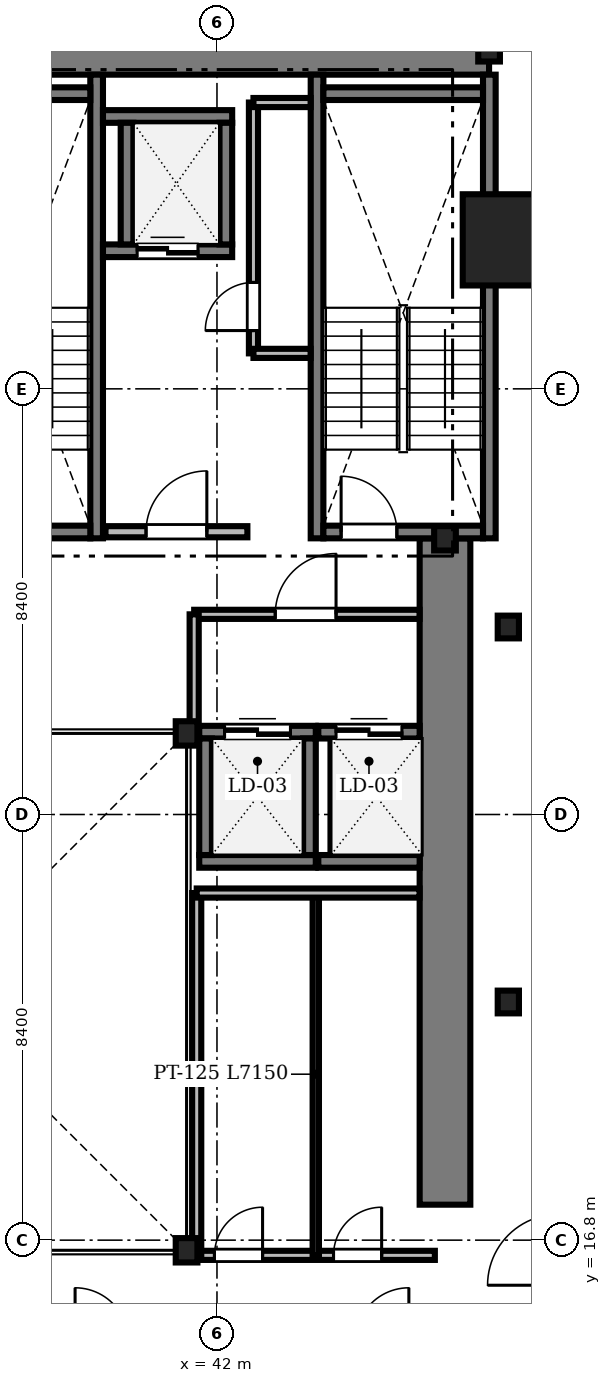
"""IFC4 building model, lengths in metres.
Left out: names, types, materials, properties, quantities, classifications, styles, units other than length and angle.
Written with IfcOpenShell. Run it as: python <this file> out.ifc"""

import sys

from ifc_helpers import new_model, si_unit, direction, frame, frame_2d, origin, origin_2d, place, context, subcontext, project, spatial, rectangle, i_section, extrude, source, transform, mapped, element, fill, save


model = new_model("IFC4")
c1 = context("Model", 3, precision=1e-05, world=origin(), true_north=direction((0.0, 1.0)))
c2 = subcontext(c1, "Body", "Model", "MODEL_VIEW")
j1 = project(units=[si_unit("LENGTHUNIT", "METRE"), si_unit("PLANEANGLEUNIT", "RADIAN")], contexts=[c1])
p1 = place(None, origin())
s1 = spatial("IfcSite", under=j1, at=p1, CompositionType="ELEMENT")
p2 = place(p1, origin())
s2 = spatial("IfcBuilding", under=s1, at=p2, CompositionType="ELEMENT")
p3 = place(p2, frame((0.0, 0.0, 86.0)))
s3 = spatial("IfcBuildingStorey", under=s2, at=p3, CompositionType="ELEMENT", Elevation=86.0)
m1 = source(origin(), c2, "Body", "SweptSolid", [
    extrude(rectangle(XDim=17.52, YDim=1.0, at=frame_2d((8.76, 0.0))), origin(), (0.0, 0.0, 1.0), 3.41),
])
p4 = place(p3, frame((29.85, 40.3, 0.0), z_axis=(0.0, 0.0, 1.0), x_axis=(1.0, 0.0, 0.0)))
e1 = element("IfcWall", 1, at=p4, inside=s3, PredefinedType="SHEAR", context=c2, shape_type="MappedRepresentation", body=[
    mapped(m1, transform((0.0, 0.0, 0.0), scale=1.0)),
])
m2 = source(origin(), c2, "Body", "SweptSolid", [
    extrude(rectangle(XDim=13.15, YDim=1.0, at=frame_2d((6.575, 0.0))), origin(), (0.0, 0.0, 1.0), 3.41),
])
p5 = place(p3, frame((46.5, 17.5, 0.0), z_axis=(0.0, 0.0, 1.0), x_axis=(0.0, 1.0, 0.0)))
e2 = element("IfcWall", 2, at=p5, inside=s3, PredefinedType="SHEAR", context=c2, shape_type="MappedRepresentation", body=[
    mapped(m2, transform((0.0, 0.0, 0.0), scale=1.0)),
])
m3 = source(origin(), c2, "Body", "SweptSolid", [
    extrude(i_section(OverallWidth=0.428, OverallDepth=0.481, WebThickness=0.04, FlangeThickness=0.063, FilletRadius=0.015, at=origin_2d()), origin(), (0.0, 0.0, 1.0), 3.41),
])
for number, where, z_axis, x_axis in (
    (3, (41.4, 16.6, 0.0), (0.0, 0.0, 1.0), (1.0, 0.0, 0.0)),
    (4, (41.4, 26.8, 0.0), (0.0, 0.0, 1.0), (1.0, 0.0, 0.0)),
    (5, (46.5, 30.65, 0.0), (0.0, 0.0, 1.0), (1.0, 0.0, 0.0)),
    (6, (47.37, 40.3, 0.0), (0.0, 0.0, 1.0), (1.0, 0.0, 0.0)),
):
    element("IfcColumn", number, at=place(p3, frame(where, z_axis=z_axis, x_axis=x_axis)), inside=s3, PredefinedType="COLUMN", context=c2, shape_type="MappedRepresentation", body=[
        mapped(m3, transform((0.0, 0.0, 0.0), scale=1.0)),
    ])
m4 = source(origin(), c2, "Body", "SweptSolid", [
    extrude(rectangle(XDim=1.8, YDim=1.8, at=origin_2d()), origin(), (0.0, 0.0, 1.0), 3.41),
])
p6 = place(p3, frame((47.75, 36.54, 0.0), z_axis=(0.0, 0.0, 1.0), x_axis=(1.0, 0.0, 0.0)))
e7 = element("IfcColumn", 7, at=p6, inside=s3, PredefinedType="COLUMN", context=c2, shape_type="MappedRepresentation", body=[
    mapped(m4, transform((0.0, 0.0, 0.0), scale=1.0)),
])
m5 = source(origin(), c2, "Body", "SweptSolid", [
    extrude(i_section(OverallWidth=0.419, OverallDepth=0.449, WebThickness=0.031, FlangeThickness=0.048, FilletRadius=0.015, at=origin_2d()), origin(), (0.0, 0.0, 1.0), 3.41),
])
for number, where, z_axis, x_axis in (
    (8, (47.75, 21.5, 0.0), (0.0, 0.0, 1.0), (1.0, 0.0, 0.0)),
    (9, (47.75, 28.9, 0.0), (0.0, 0.0, 1.0), (1.0, 0.0, 0.0)),
):
    element("IfcColumn", number, at=place(p3, frame(where, z_axis=z_axis, x_axis=x_axis)), inside=s3, PredefinedType="COLUMN", context=c2, shape_type="MappedRepresentation", body=[
        mapped(m5, transform((0.0, 0.0, 0.0), scale=1.0)),
    ])
m6 = source(origin(), c2, "Body", "SweptSolid", [
    extrude(rectangle(XDim=9.15, YDim=0.25, at=frame_2d((4.575, 0.0))), origin(), (0.0, 0.0, 1.0), 3.45),
])
p7 = place(p3, frame((39.625, 30.65, 0.0), z_axis=(0.0, 0.0, 1.0), x_axis=(0.0, 1.0, 0.0)))
e10 = element("IfcWall", 10, at=p7, inside=s3, PredefinedType="SOLIDWALL", context=c2, shape_type="MappedRepresentation", body=[
    mapped(m6, transform((0.0, 0.0, 0.0), scale=1.0)),
])
m7 = source(origin(), c2, "Body", "SweptSolid", [
    extrude(rectangle(XDim=3.15, YDim=0.25, at=frame_2d((1.575, 0.0))), origin(), (0.0, 0.0, 1.0), 3.45),
])
p8 = place(p3, frame((36.35, 39.425, 0.0), z_axis=(0.0, 0.0, 1.0), x_axis=(1.0, 0.0, 0.0)))
e11 = element("IfcWall", 11, at=p8, inside=s3, PredefinedType="SOLIDWALL", context=c2, shape_type="MappedRepresentation", body=[
    mapped(m7, transform((0.0, 0.0, 0.0), scale=1.0)),
])
p9 = place(p3, frame((36.35, 30.775, 0.0), z_axis=(0.0, 0.0, 1.0), x_axis=(1.0, 0.0, 0.0)))
e12 = element("IfcWall", 12, at=p9, inside=s3, PredefinedType="SOLIDWALL", context=c2, shape_type="MappedRepresentation", body=[
    mapped(m7, transform((0.0, 0.0, 0.0), scale=1.0)),
])
m8 = source(origin(), c2, "Body", "SweptSolid", [
    extrude(rectangle(XDim=1.1, YDim=2.2, at=frame_2d((0.55, 1.1))), frame((0.0, 0.135, 0.0), z_axis=(0.0, -1.0, 0.0), x_axis=(1.0, 0.0, 0.0)), (0.0, 0.0, 1.0), 0.27),
])
p10 = place(p9, frame((0.35, 0.0, 0.0)))
e13 = element("IfcOpeningElement", 13, at=p10, cuts=e12, PredefinedType="OPENING", context=c2, shape_type="MappedRepresentation", body=[
    mapped(m8, transform((0.0, 0.0, 0.0), scale=1.0)),
])
for number, where, z_axis, x_axis in (
    (14, (43.975, 30.65, 0.0), (0.0, 0.0, 1.0), (0.0, 1.0, 0.0)),
    (15, (47.375, 30.65, 0.0), (0.0, 0.0, 1.0), (0.0, 1.0, 0.0)),
):
    element("IfcWall", number, at=place(p3, frame(where, z_axis=z_axis, x_axis=x_axis)), inside=s3, PredefinedType="SOLIDWALL", context=c2, shape_type="MappedRepresentation", body=[
        mapped(m6, transform((0.0, 0.0, 0.0), scale=1.0)),
    ])
p11 = place(p3, frame((44.1, 39.425, 0.0), z_axis=(0.0, 0.0, 1.0), x_axis=(1.0, 0.0, 0.0)))
e16 = element("IfcWall", 16, at=p11, inside=s3, PredefinedType="SOLIDWALL", context=c2, shape_type="MappedRepresentation", body=[
    mapped(m7, transform((0.0, 0.0, 0.0), scale=1.0)),
])
p12 = place(p3, frame((44.1, 30.775, 0.0), z_axis=(0.0, 0.0, 1.0), x_axis=(1.0, 0.0, 0.0)))
e17 = element("IfcWall", 17, at=p12, inside=s3, PredefinedType="SOLIDWALL", context=c2, shape_type="MappedRepresentation", body=[
    mapped(m7, transform((0.0, 0.0, 0.0), scale=1.0)),
])
p13 = place(p12, frame((0.35, 0.0, 0.0)))
e18 = element("IfcOpeningElement", 18, at=p13, cuts=e17, PredefinedType="OPENING", context=c2, shape_type="MappedRepresentation", body=[
    mapped(m8, transform((0.0, 0.0, 0.0), scale=1.0)),
])
m9 = source(origin(), c2, "Body", "SweptSolid", [
    extrude(rectangle(XDim=2.8, YDim=0.22, at=frame_2d((1.4, 0.0))), origin(), (0.0, 0.0, 1.0), 3.41),
])
p14 = place(p3, frame((39.8, 30.78, 0.0), z_axis=(0.0, 0.0, 1.0), x_axis=(1.0, 0.0, 0.0)))
e19 = element("IfcWall", 19, at=p14, inside=s3, PredefinedType="SOLIDWALL", context=c2, shape_type="MappedRepresentation", body=[
    mapped(m9, transform((0.0, 0.0, 0.0), scale=1.0)),
])
m10 = source(origin(), c2, "Body", "SweptSolid", [
    extrude(rectangle(XDim=1.2, YDim=2.2, at=frame_2d((0.6, 1.1))), frame((0.0, 0.12, 0.0), z_axis=(0.0, -1.0, 0.0), x_axis=(1.0, 0.0, 0.0)), (0.0, 0.0, 1.0), 0.24),
])
p15 = place(p14, frame((0.8, 0.0, 0.0)))
e20 = element("IfcOpeningElement", 20, at=p15, cuts=e19, PredefinedType="OPENING", context=c2, shape_type="MappedRepresentation", body=[
    mapped(m10, transform((0.0, 0.0, 0.0), scale=1.0)),
])
m11 = source(origin(), c2, "Body", "SweptSolid", [
    extrude(rectangle(XDim=2.55, YDim=0.25, at=frame_2d((1.275, 0.0))), origin(), (0.0, 0.0, 1.0), 3.41),
])
p16 = place(p3, frame((39.75, 36.325, 0.0), z_axis=(0.0, 0.0, 1.0), x_axis=(1.0, 0.0, 0.0)))
e21 = element("IfcWall", 21, at=p16, inside=s3, PredefinedType="SOLIDWALL", context=c2, shape_type="MappedRepresentation", body=[
    mapped(m11, transform((0.0, 0.0, 0.0), scale=1.0)),
])
m12 = source(origin(), c2, "Body", "SweptSolid", [
    extrude(rectangle(XDim=1.2, YDim=2.25, at=frame_2d((0.6, 1.125))), frame((0.0, 0.135, 0.0), z_axis=(0.0, -1.0, 0.0), x_axis=(1.0, 0.0, 0.0)), (0.0, 0.0, 1.0), 0.27),
])
p17 = place(p16, frame((0.675, 0.0, 0.0)))
e22 = element("IfcOpeningElement", 22, at=p17, cuts=e21, PredefinedType="OPENING", context=c2, shape_type="MappedRepresentation", body=[
    mapped(m12, transform((0.0, 0.0, 0.0), scale=1.0)),
])
p18 = place(p3, frame((39.75, 38.975, 0.0), z_axis=(0.0, 0.0, 1.0), x_axis=(1.0, 0.0, 0.0)))
e23 = element("IfcWall", 23, at=p18, inside=s3, PredefinedType="SOLIDWALL", context=c2, shape_type="MappedRepresentation", body=[
    mapped(m11, transform((0.0, 0.0, 0.0), scale=1.0)),
])
m13 = source(origin(), c2, "Body", "SweptSolid", [
    extrude(rectangle(XDim=2.4, YDim=0.25, at=frame_2d((1.2, 0.0))), origin(), (0.0, 0.0, 1.0), 3.41),
])
for number, where, z_axis, x_axis in (
    (24, (40.225, 36.45, 0.0), (0.0, 0.0, 1.0), (0.0, 1.0, 0.0)),
    (25, (42.175, 36.45, 0.0), (0.0, 0.0, 1.0), (0.0, 1.0, 0.0)),
):
    element("IfcWall", number, at=place(p3, frame(where, z_axis=z_axis, x_axis=x_axis)), inside=s3, PredefinedType="SOLIDWALL", context=c2, shape_type="MappedRepresentation", body=[
        mapped(m13, transform((0.0, 0.0, 0.0), scale=1.0)),
    ])
m14 = source(origin(), c2, "Body", "SweptSolid", [
    extrude(rectangle(XDim=2.3, YDim=0.25, at=frame_2d((1.15, 0.0))), origin(), (0.0, 0.0, 1.0), 3.41),
])
p19 = place(p3, frame((41.65, 24.275, 0.0), z_axis=(0.0, 0.0, 1.0), x_axis=(1.0, 0.0, 0.0)))
e26 = element("IfcWall", 26, at=p19, inside=s3, PredefinedType="SOLIDWALL", context=c2, shape_type="MappedRepresentation", body=[
    mapped(m14, transform((0.0, 0.0, 0.0), scale=1.0)),
])
p20 = place(p3, frame((41.65, 26.825, 0.0), z_axis=(0.0, 0.0, 1.0), x_axis=(1.0, 0.0, 0.0)))
e27 = element("IfcWall", 27, at=p20, inside=s3, PredefinedType="SOLIDWALL", context=c2, shape_type="MappedRepresentation", body=[
    mapped(m14, transform((0.0, 0.0, 0.0), scale=1.0)),
])
m15 = source(origin(), c2, "Body", "SweptSolid", [
    extrude(rectangle(XDim=1.3, YDim=2.3, at=frame_2d((0.65, 1.15))), frame((0.0, 0.135, 0.0), z_axis=(0.0, -1.0, 0.0), x_axis=(1.0, 0.0, 0.0)), (0.0, 0.0, 1.0), 0.27),
])
p21 = place(p20, frame((0.5, 0.0, 0.0)))
e28 = element("IfcOpeningElement", 28, at=p21, cuts=e27, PredefinedType="OPENING", context=c2, shape_type="MappedRepresentation", body=[
    mapped(m15, transform((0.0, 0.0, 0.0), scale=1.0)),
])
for number, where, z_axis, x_axis in (
    (29, (41.775, 24.4, 0.0), (0.0, 0.0, 1.0), (0.0, 1.0, 0.0)),
    (30, (43.825, 24.4, 0.0), (0.0, 0.0, 1.0), (0.0, 1.0, 0.0)),
):
    element("IfcWall", number, at=place(p3, frame(where, z_axis=z_axis, x_axis=x_axis)), inside=s3, PredefinedType="SOLIDWALL", context=c2, shape_type="MappedRepresentation", body=[
        mapped(m14, transform((0.0, 0.0, 0.0), scale=1.0)),
    ])
m16 = source(origin(), c2, "Body", "SweptSolid", [
    extrude(rectangle(XDim=2.0, YDim=0.25, at=frame_2d((1.0, 0.0))), origin(), (0.0, 0.0, 1.0), 3.41),
])
p22 = place(p3, frame((44.0, 24.275, 0.0), z_axis=(0.0, 0.0, 1.0), x_axis=(1.0, 0.0, 0.0)))
e31 = element("IfcWall", 31, at=p22, inside=s3, PredefinedType="SOLIDWALL", context=c2, shape_type="MappedRepresentation", body=[
    mapped(m16, transform((0.0, 0.0, 0.0), scale=1.0)),
])
p23 = place(p3, frame((44.0, 26.825, 0.0), z_axis=(0.0, 0.0, 1.0), x_axis=(1.0, 0.0, 0.0)))
e32 = element("IfcWall", 32, at=p23, inside=s3, PredefinedType="SOLIDWALL", context=c2, shape_type="MappedRepresentation", body=[
    mapped(m16, transform((0.0, 0.0, 0.0), scale=1.0)),
])
p24 = place(p23, frame((0.35, 0.0, 0.0)))
e33 = element("IfcOpeningElement", 33, at=p24, cuts=e32, PredefinedType="OPENING", context=c2, shape_type="MappedRepresentation", body=[
    mapped(m15, transform((0.0, 0.0, 0.0), scale=1.0)),
])
m17 = source(origin(), c2, "Body", "SweptSolid", [
    extrude(rectangle(XDim=4.95, YDim=0.18, at=frame_2d((2.475, 0.0))), origin(), (0.0, 0.0, 1.0), 3.41),
])
p25 = place(p3, frame((42.72, 34.3, 0.0), z_axis=(0.0, 0.0, 1.0), x_axis=(0.0, 1.0, 0.0)))
e34 = element("IfcWall", 34, at=p25, inside=s3, PredefinedType="PARTITIONING", context=c2, shape_type="MappedRepresentation", body=[
    mapped(m17, transform((0.0, 0.0, 0.0), scale=1.0)),
])
m18 = source(origin(), c2, "Body", "SweptSolid", [
    extrude(rectangle(XDim=0.95, YDim=2.15, at=frame_2d((0.475, 1.075))), frame((0.0, 0.1, 0.0), z_axis=(0.0, -1.0, 0.0), x_axis=(1.0, 0.0, 0.0)), (0.0, 0.0, 1.0), 0.2),
])
p26 = place(p25, frame((0.45, 0.0, 0.0)))
e35 = element("IfcOpeningElement", 35, at=p26, cuts=e34, PredefinedType="OPENING", context=c2, shape_type="MappedRepresentation", body=[
    mapped(m18, transform((0.0, 0.0, 0.0), scale=1.0)),
])
m19 = source(origin(), c2, "Body", "SweptSolid", [
    extrude(rectangle(XDim=4.448, YDim=0.18, at=frame_2d((2.224, 0.0))), origin(), (0.0, 0.0, 1.0), 3.042),
])
p27 = place(p3, frame((41.55, 29.15, 0.0), z_axis=(0.0, 0.0, 1.0), x_axis=(1.0, 0.0, 0.0)))
e36 = element("IfcWall", 36, at=p27, inside=s3, PredefinedType="PARTITIONING", context=c2, shape_type="MappedRepresentation", body=[
    mapped(m19, transform((0.0, 0.0, 0.0), scale=1.0)),
])
m20 = source(origin(), c2, "Body", "SweptSolid", [
    extrude(rectangle(XDim=1.2, YDim=2.2, at=frame_2d((0.6, 1.1))), frame((0.0, 0.1, 0.0), z_axis=(0.0, -1.0, 0.0), x_axis=(1.0, 0.0, 0.0)), (0.0, 0.0, 1.0), 0.2),
])
p28 = place(p27, frame((1.6, 0.0, 0.0)))
e37 = element("IfcOpeningElement", 37, at=p28, cuts=e36, PredefinedType="OPENING", context=c2, shape_type="MappedRepresentation", body=[
    mapped(m20, transform((0.0, 0.0, 0.0), scale=1.0)),
])
m21 = source(origin(), c2, "Body", "SweptSolid", [
    extrude(rectangle(XDim=4.7, YDim=0.18, at=frame_2d((2.35, 0.0))), origin(), (0.0, 0.0, 1.0), 2.802),
])
p29 = place(p3, frame((41.6, 16.5, 0.0), z_axis=(0.0, 0.0, 1.0), x_axis=(1.0, 0.0, 0.0)))
e38 = element("IfcWall", 38, at=p29, inside=s3, PredefinedType="PARTITIONING", context=c2, shape_type="MappedRepresentation", body=[
    mapped(m21, transform((0.0, 0.0, 0.0), scale=1.0)),
])
p30 = place(p29, frame((0.35, 0.0, 0.0)))
e39 = element("IfcOpeningElement", 39, at=p30, cuts=e38, PredefinedType="OPENING", context=c2, shape_type="MappedRepresentation", body=[
    mapped(m18, transform((0.0, 0.0, 0.0), scale=1.0)),
])
p31 = place(p29, frame((2.7, 0.0, 0.0)))
e40 = element("IfcOpeningElement", 40, at=p31, cuts=e38, PredefinedType="OPENING", context=c2, shape_type="MappedRepresentation", body=[
    mapped(m18, transform((0.0, 0.0, 0.0), scale=1.0)),
])
m22 = source(origin(), c2, "Body", "SweptSolid", [
    extrude(rectangle(XDim=7.15, YDim=0.18, at=frame_2d((3.575, 0.0))), origin(), (0.0, 0.0, 1.0), 2.802),
])
p32 = place(p3, frame((41.6, 16.5, 0.0), z_axis=(0.0, 0.0, 1.0), x_axis=(0.0, 1.0, 0.0)))
e41 = element("IfcWall", 41, at=p32, inside=s3, PredefinedType="PARTITIONING", context=c2, shape_type="MappedRepresentation", body=[
    mapped(m22, transform((0.0, 0.0, 0.0), scale=1.0)),
])
m23 = source(origin(), c2, "Body", "SweptSolid", [
    extrude(rectangle(XDim=7.15, YDim=0.125, at=frame_2d((3.575, 0.0))), origin(), (0.0, 0.0, 1.0), 2.802),
])
p33 = place(p3, frame((43.95, 16.5, 0.0), z_axis=(0.0, 0.0, 1.0), x_axis=(0.0, 1.0, 0.0)))
e42 = element("IfcWall", 42, at=p33, inside=s3, PredefinedType="PARTITIONING", context=c2, shape_type="MappedRepresentation", body=[
    mapped(m23, transform((0.0, 0.0, 0.0), scale=1.0)),
])
m24 = source(origin(), c2, "Body", "SweptSolid", [
    extrude(rectangle(XDim=4.398, YDim=0.18, at=frame_2d((2.199, 0.0))), origin(), (0.0, 0.0, 1.0), 3.41),
])
p34 = place(p3, frame((41.6, 23.65, 0.0), z_axis=(0.0, 0.0, 1.0), x_axis=(1.0, 0.0, 0.0)))
e43 = element("IfcWall", 43, at=p34, inside=s3, PredefinedType="PARTITIONING", context=c2, shape_type="MappedRepresentation", body=[
    mapped(m24, transform((0.0, 0.0, 0.0), scale=1.0)),
])
m25 = source(origin(), c2, "Body", "SweptSolid", [
    extrude(rectangle(XDim=2.35, YDim=0.18, at=frame_2d((1.175, 0.0))), origin(), (0.0, 0.0, 1.0), 2.802),
])
p35 = place(p3, frame((41.55, 26.8, 0.0), z_axis=(0.0, 0.0, 1.0), x_axis=(0.0, 1.0, 0.0)))
e44 = element("IfcWall", 44, at=p35, inside=s3, PredefinedType="PARTITIONING", context=c2, shape_type="MappedRepresentation", body=[
    mapped(m25, transform((0.0, 0.0, 0.0), scale=1.0)),
])
m26 = source(origin(), c2, "Body", "SweptSolid", [
    extrude(rectangle(XDim=1.128, YDim=0.18, at=frame_2d((0.564, 0.0))), origin(), (0.0, 0.0, 1.0), 3.41),
])
for number, where, z_axis, x_axis in (
    (45, (42.72, 34.3, 0.0), (0.0, 0.0, 1.0), (1.0, 0.0, 0.0)),
    (46, (42.72, 39.25, 0.0), (0.0, 0.0, 1.0), (1.0, 0.0, 0.0)),
):
    element("IfcWall", number, at=place(p3, frame(where, z_axis=z_axis, x_axis=x_axis)), inside=s3, PredefinedType="PARTITIONING", context=c2, shape_type="MappedRepresentation", body=[
        mapped(m26, transform((0.0, 0.0, 0.0), scale=1.0)),
    ])
m27 = source(origin(), c2, "Body", "SweptSolid", [
    extrude(rectangle(XDim=1.1, YDim=2.2, at=frame_2d((0.55, 1.1))), frame((0.0, 0.025, 0.0), z_axis=(0.0, -1.0, 0.0), x_axis=(1.0, 0.0, 0.0)), (0.0, 0.0, 1.0), 0.05),
])
p36 = place(p13, origin())
e47 = element("IfcDoor", 47, at=p36, inside=s3, OperationType="SINGLE_SWING_LEFT", PredefinedType="DOOR", context=c2, shape_type="MappedRepresentation", body=[
    mapped(m27, transform((0.0, 0.0, 0.0), scale=1.0)),
])
fill(e18, e47)
m28 = source(origin(), c2, "Body", "SweptSolid", [
    extrude(rectangle(XDim=1.2, YDim=2.2, at=frame_2d((0.6, 1.1))), frame((0.0, 0.025, 0.0), z_axis=(0.0, -1.0, 0.0), x_axis=(1.0, 0.0, 0.0)), (0.0, 0.0, 1.0), 0.05),
])
p37 = place(p15, origin())
e48 = element("IfcDoor", 48, at=p37, inside=s3, OperationType="SINGLE_SWING_RIGHT", PredefinedType="DOOR", context=c2, shape_type="MappedRepresentation", body=[
    mapped(m28, transform((0.0, 0.0, 0.0), scale=1.0)),
])
fill(e20, e48)
m29 = source(origin(), c2, "Body", "SweptSolid", [
    extrude(rectangle(XDim=1.2, YDim=2.25, at=frame_2d((0.6, 1.125))), frame((0.0, 0.025, 0.0), z_axis=(0.0, -1.0, 0.0), x_axis=(1.0, 0.0, 0.0)), (0.0, 0.0, 1.0), 0.05),
])
p38 = place(p17, origin())
e49 = element("IfcDoor", 49, at=p38, inside=s3, OperationType="DOUBLE_DOOR_SLIDING", PredefinedType="DOOR", context=c2, shape_type="MappedRepresentation", body=[
    mapped(m29, transform((0.0, 0.0, 0.0), scale=1.0)),
])
fill(e22, e49)
m30 = source(origin(), c2, "Body", "SweptSolid", [
    extrude(rectangle(XDim=1.3, YDim=2.3, at=frame_2d((0.65, 1.15))), frame((0.0, 0.025, 0.0), z_axis=(0.0, -1.0, 0.0), x_axis=(1.0, 0.0, 0.0)), (0.0, 0.0, 1.0), 0.05),
])
p39 = place(p21, origin())
e50 = element("IfcDoor", 50, at=p39, inside=s3, OperationType="DOUBLE_DOOR_SLIDING", PredefinedType="DOOR", context=c2, shape_type="MappedRepresentation", body=[
    mapped(m30, transform((0.0, 0.0, 0.0), scale=1.0)),
])
fill(e28, e50)
p40 = place(p24, origin())
e51 = element("IfcDoor", 51, at=p40, inside=s3, OperationType="DOUBLE_DOOR_SLIDING", PredefinedType="DOOR", context=c2, shape_type="MappedRepresentation", body=[
    mapped(m30, transform((0.0, 0.0, 0.0), scale=1.0)),
])
fill(e33, e51)
m31 = source(origin(), c2, "Body", "SweptSolid", [
    extrude(rectangle(XDim=0.95, YDim=2.15, at=frame_2d((0.475, 1.075))), frame((0.0, 0.025, 0.0), z_axis=(0.0, -1.0, 0.0), x_axis=(1.0, 0.0, 0.0)), (0.0, 0.0, 1.0), 0.05),
])
p41 = place(p26, origin())
e52 = element("IfcDoor", 52, at=p41, inside=s3, OperationType="SINGLE_SWING_LEFT", PredefinedType="DOOR", context=c2, shape_type="MappedRepresentation", body=[
    mapped(m31, transform((0.0, 0.0, 0.0), scale=1.0)),
])
fill(e35, e52)
p42 = place(p28, origin())
e53 = element("IfcDoor", 53, at=p42, inside=s3, OperationType="SINGLE_SWING_RIGHT", PredefinedType="DOOR", context=c2, shape_type="MappedRepresentation", body=[
    mapped(m28, transform((0.0, 0.0, 0.0), scale=1.0)),
])
fill(e37, e53)
p43 = place(p30, origin())
e54 = element("IfcDoor", 54, at=p43, inside=s3, OperationType="SINGLE_SWING_RIGHT", PredefinedType="DOOR", context=c2, shape_type="MappedRepresentation", body=[
    mapped(m31, transform((0.0, 0.0, 0.0), scale=1.0)),
])
fill(e39, e54)
p44 = place(p31, origin())
e55 = element("IfcDoor", 55, at=p44, inside=s3, OperationType="SINGLE_SWING_RIGHT", PredefinedType="DOOR", context=c2, shape_type="MappedRepresentation", body=[
    mapped(m31, transform((0.0, 0.0, 0.0), scale=1.0)),
])
fill(e40, e55)
save(model, sys.argv[1])
